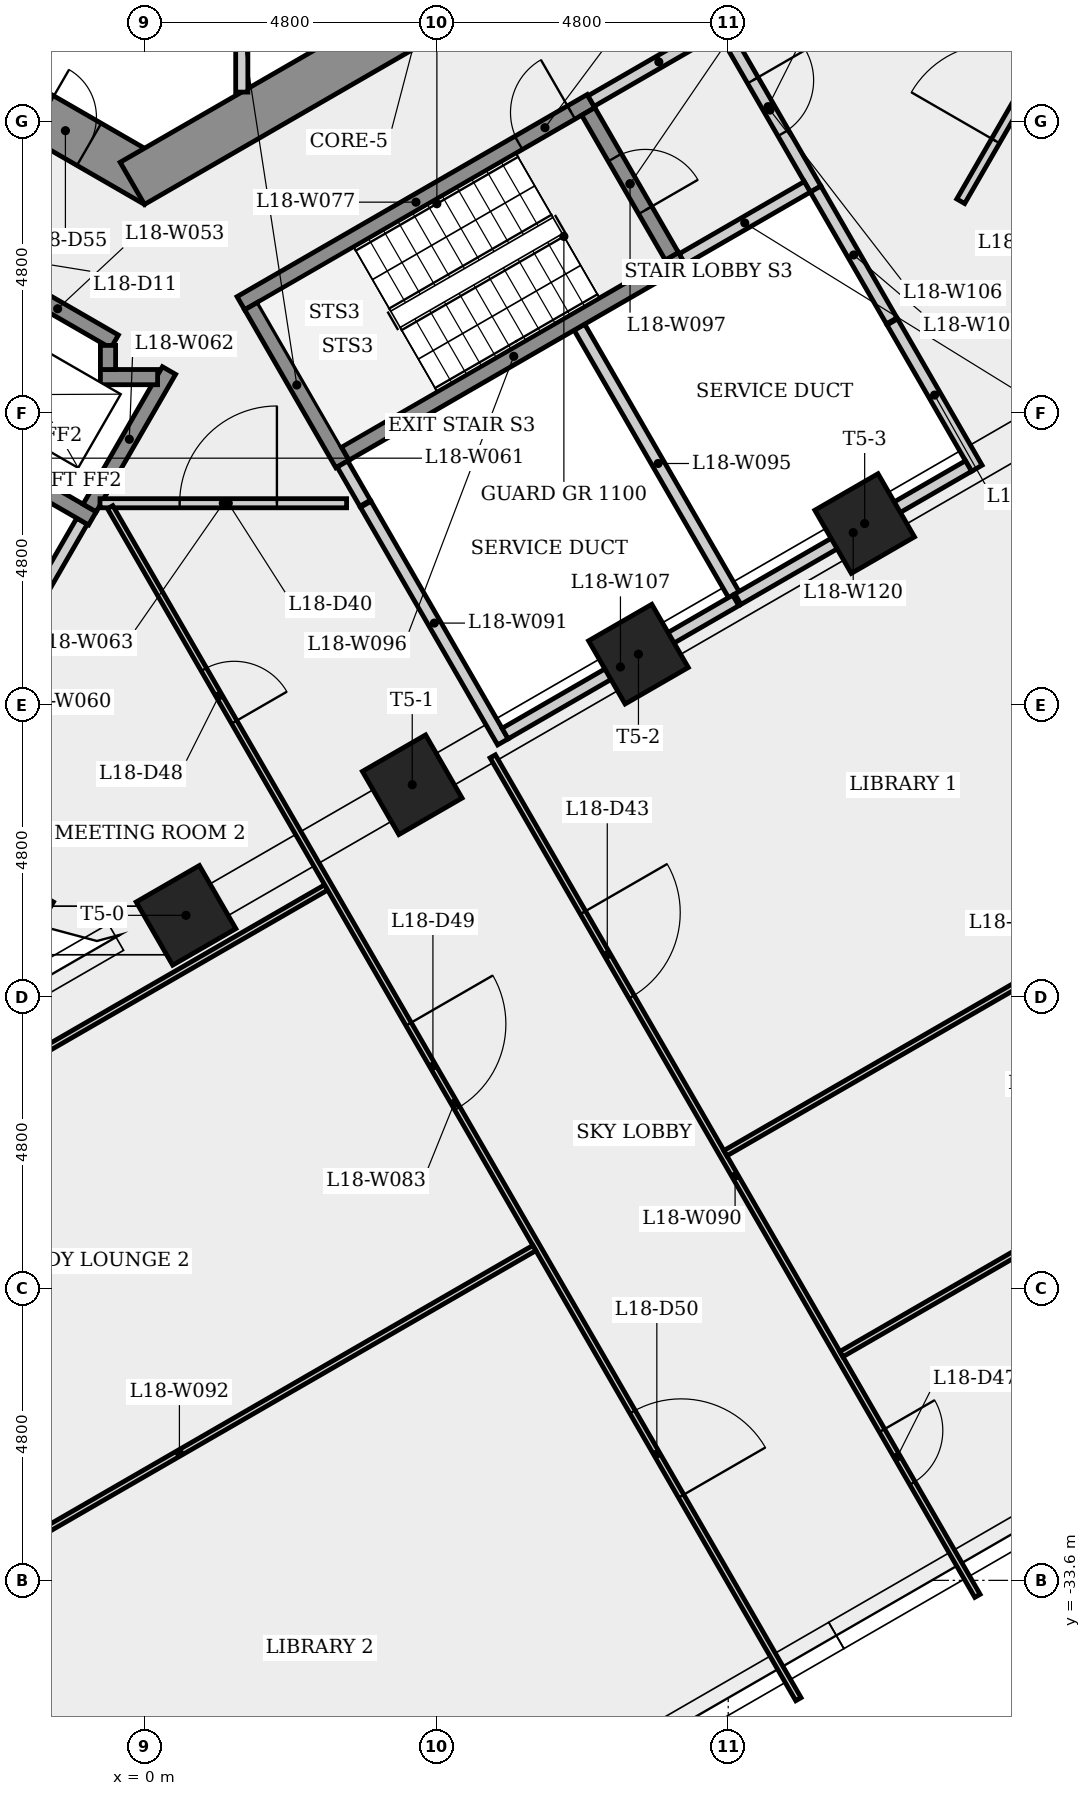
"""IFC4 building model, lengths in metres.
Left out: names, types, materials, properties, quantities, classifications, styles, units other than length and angle.
Written with IfcOpenShell. Run it as: python <this file> out.ifc"""

import sys

from ifc_helpers import new_model, si_unit, direction, frame, frame_2d, origin, origin_2d, place, context, subcontext, project, spatial, rectangle, extrude, element, fill, save


model = new_model("IFC4")
c1 = context("Model", 3, precision=1e-05, world=origin(), true_north=direction((0.0, 1.0)))
c2 = subcontext(c1, "Body", "Model", "MODEL_VIEW")
j1 = project(units=[si_unit("LENGTHUNIT", "METRE"), si_unit("PLANEANGLEUNIT", "RADIAN")], contexts=[c1])
p1 = place(None, origin())
s1 = spatial("IfcSite", under=j1, at=p1, CompositionType="ELEMENT")
p2 = place(p1, origin())
s2 = spatial("IfcBuilding", under=s1, at=p2, CompositionType="ELEMENT")
p3 = place(p2, frame((0.0, 0.0, 70.3)))
s3 = spatial("IfcBuildingStorey", under=s2, at=p3, CompositionType="ELEMENT", Elevation=70.3)
p4 = place(p3, frame((-9.3, -5.138, 0.0), z_axis=(0.0, 0.0, 1.0), x_axis=(0.866023993627, -0.500002442456, 0.0)))
e1 = element("IfcWall", 1, at=p4, inside=s3, PredefinedType="SHEAR", context=c2, shape_type="SweptSolid", body=[
    extrude(rectangle(XDim=10.97, YDim=0.8, at=frame_2d((5.485, 0.0))), origin(), (0.0, 0.0, 1.0), 4.0),
])
p5 = place(p4, frame((2.153, 0.0, 0.0)))
e2 = element("IfcOpeningElement", 2, at=p5, cuts=e1, PredefinedType="OPENING", context=c2, shape_type="SweptSolid", body=[
    extrude(rectangle(XDim=0.9, YDim=2.1, at=frame_2d((0.45, 1.05))), frame((0.0, 0.41, 0.0), z_axis=(0.0, -1.0, 0.0), x_axis=(1.0, 0.0, 0.0)), (0.0, 0.0, 1.0), 0.82),
])
p6 = place(p4, frame((8.787, 0.0, 0.0)))
e3 = element("IfcOpeningElement", 3, at=p6, cuts=e1, PredefinedType="OPENING", context=c2, shape_type="SweptSolid", body=[
    extrude(rectangle(XDim=0.9, YDim=2.1, at=frame_2d((0.45, 1.05))), frame((0.0, 0.41, 0.0), z_axis=(0.0, -1.0, 0.0), x_axis=(1.0, 0.0, 0.0)), (0.0, 0.0, 1.0), 0.82),
])
p7 = place(p3, frame((-0.2, -10.623, 0.0), z_axis=(0.0, 0.0, 1.0), x_axis=(0.866023993627, 0.500002442456, 0.0)))
e4 = element("IfcWall", 4, at=p7, inside=s3, PredefinedType="SHEAR", context=c2, shape_type="SweptSolid", body=[
    extrude(rectangle(XDim=10.97, YDim=0.8, at=frame_2d((5.485, 0.0))), origin(), (0.0, 0.0, 1.0), 4.0),
])
p8 = place(p7, frame((7.57, 0.0, 0.0)))
e5 = element("IfcOpeningElement", 5, at=p8, cuts=e4, PredefinedType="OPENING", context=c2, shape_type="SweptSolid", body=[
    extrude(rectangle(XDim=0.9, YDim=2.1, at=frame_2d((0.45, 1.05))), frame((0.0, 0.41, 0.0), z_axis=(0.0, -1.0, 0.0), x_axis=(1.0, 0.0, 0.0)), (0.0, 0.0, 1.0), 0.82),
])
for number, where, z_axis, x_axis in (
    (6, (-2.317, -22.662, 0.0), (0.0, 0.0, 1.0), (-0.5, -0.866, 0.0)),
    (7, (0.683, -22.662, 0.0), (0.0, 0.0, 1.0), (0.5, -0.866, 0.0)),
    (8, (4.403, -20.514, 0.0), (0.0, 0.0, 1.0), (0.5, -0.866, 0.0)),
    (9, (8.124, -18.366, 0.0), (0.0, 0.0, 1.0), (0.5, -0.866, 0.0)),
    (10, (11.844, -16.219, 0.0), (0.0, 0.0, 1.0), (0.5, -0.866, 0.0)),
):
    element("IfcColumn", number, at=place(p3, frame(where, z_axis=z_axis, x_axis=x_axis)), inside=s3, PredefinedType="COLUMN", context=c2, shape_type="SweptSolid", body=[
        extrude(rectangle(XDim=1.2, YDim=1.2, at=origin_2d()), origin(), (0.0, 0.0, 1.0), 4.0),
    ])
p9 = place(p3, frame((-2.364, -12.145, 0.0), z_axis=(0.0, 0.0, 1.0), x_axis=(0.86603892542, -0.499976579108, 0.0)))
e11 = element("IfcWall", 11, at=p9, inside=s3, PredefinedType="SHEAR", context=c2, shape_type="SweptSolid", body=[
    extrude(rectangle(XDim=2.162, YDim=0.25, at=frame_2d((1.081, 0.0))), origin(), (0.0, 0.0, 1.0), 3.6),
])
p10 = place(p3, frame((-1.027, -16.179, 0.0), z_axis=(0.0, 0.0, 1.0), x_axis=(-0.499984476993, -0.866034365811, 0.0)))
e12 = element("IfcWall", 12, at=p10, inside=s3, PredefinedType="PLUMBINGWALL", context=c2, shape_type="SweptSolid", body=[
    extrude(rectangle(XDim=6.856, YDim=0.2, at=frame_2d((3.428, 0.0))), origin(), (0.0, 0.0, 1.0), 3.6),
])
p11 = place(p3, frame((-0.856, -16.133, 0.0), z_axis=(0.0, 0.0, 1.0), x_axis=(-0.866021716278, 0.500006386895, 0.0)))
e13 = element("IfcWall", 13, at=p11, inside=s3, PredefinedType="SHEAR", context=c2, shape_type="SweptSolid", body=[
    extrude(rectangle(XDim=3.3, YDim=0.25, at=frame_2d((1.65, 0.0))), origin(), (0.0, 0.0, 1.0), 3.6),
])
p12 = place(p3, frame((-0.902, -15.962, 0.0), z_axis=(0.0, 0.0, 1.0), x_axis=(0.499981517636, 0.866036074319, 0.0)))
e14 = element("IfcWall", 14, at=p12, inside=s3, PredefinedType="SHEAR", context=c2, shape_type="SweptSolid", body=[
    extrude(rectangle(XDim=2.61, YDim=0.25, at=frame_2d((1.305, 0.0))), origin(), (0.0, 0.0, 1.0), 3.6),
])
p13 = place(p3, frame((-0.732, -15.885, 0.0), z_axis=(0.0, 0.0, 1.0), x_axis=(1.0, 0.0, 0.0)))
e15 = element("IfcWall", 15, at=p13, inside=s3, PredefinedType="PARTITIONING", context=c2, shape_type="SweptSolid", body=[
    extrude(rectangle(XDim=4.056, YDim=0.15, at=frame_2d((2.028, 0.0))), origin(), (0.0, 0.0, 1.0), 3.6),
])
p14 = place(p13, frame((1.31, 0.0, 0.0)))
e16 = element("IfcOpeningElement", 16, at=p14, cuts=e15, PredefinedType="OPENING", context=c2, shape_type="SweptSolid", body=[
    extrude(rectangle(XDim=1.6, YDim=2.1, at=frame_2d((0.8, 1.05))), frame((0.0, 0.085, 0.0), z_axis=(0.0, -1.0, 0.0), x_axis=(1.0, 0.0, 0.0)), (0.0, 0.0, 1.0), 0.17),
])
p15 = place(p3, frame((-0.725, -13.81, 0.0), z_axis=(0.0, 0.0, 1.0), x_axis=(1.0, 0.0, 0.0)))
e17 = element("IfcWall", 17, at=p15, inside=s3, PredefinedType="SHEAR", context=c2, shape_type="SweptSolid", body=[
    extrude(rectangle(XDim=0.941, YDim=0.25, at=frame_2d((0.47, 0.0))), origin(), (0.0, 0.0, 1.0), 4.0),
])
p16 = place(p3, frame((-0.6, -13.289, 0.0), z_axis=(0.0, 0.0, 1.0), x_axis=(0.0, -1.0, 0.0)))
e18 = element("IfcWall", 18, at=p16, inside=s3, PredefinedType="SHEAR", context=c2, shape_type="SweptSolid", body=[
    extrude(rectangle(XDim=0.396, YDim=0.25, at=frame_2d((0.198, 0.0))), origin(), (0.0, 0.0, 1.0), 4.0),
])
p17 = place(p3, frame((1.6, -5.275, 0.0), z_axis=(0.0, 0.0, 1.0), x_axis=(0.0, -1.0, 0.0)))
e19 = element("IfcWall", 19, at=p17, inside=s3, PredefinedType="PARTITIONING", context=c2, shape_type="SweptSolid", body=[
    extrude(rectangle(XDim=3.847, YDim=0.2, at=frame_2d((1.924, 0.0))), origin(), (0.0, 0.0, 1.0), 3.6),
])
p18 = place(p3, frame((1.585, -12.595, 0.0), z_axis=(0.0, 0.0, 1.0), x_axis=(0.866036417653, 0.499980922934, 0.0)))
e20 = element("IfcWall", 20, at=p18, inside=s3, PredefinedType="SHEAR", context=c2, shape_type="SweptSolid", body=[
    extrude(rectangle(XDim=6.65, YDim=0.25, at=frame_2d((3.325, 0.0))), origin(), (0.0, 0.0, 1.0), 3.6),
])
p19 = place(p18, frame((5.275, 0.0, 0.0)))
e21 = element("IfcOpeningElement", 21, at=p19, cuts=e20, PredefinedType="OPENING", context=c2, shape_type="SweptSolid", body=[
    extrude(rectangle(XDim=1.0, YDim=2.1, at=frame_2d((0.5, 1.05))), frame((0.0, 0.135, 0.0), z_axis=(0.0, -1.0, 0.0), x_axis=(1.0, 0.0, 0.0)), (0.0, 0.0, 1.0), 0.27),
])
p20 = place(p3, frame((2.988, -22.203, 0.0), z_axis=(0.0, 0.0, 1.0), x_axis=(-0.866023652272, -0.500003033696, 0.0)))
e22 = element("IfcWall", 22, at=p20, inside=s3, PredefinedType="PARTITIONING", context=c2, shape_type="SweptSolid", body=[
    extrude(rectangle(XDim=13.482, YDim=0.1, at=frame_2d((6.741, 0.0))), origin(), (0.0, 0.0, 1.0), 3.6),
])
p21 = place(p3, frame((-0.565, -15.949, 0.0), z_axis=(0.0, 0.0, 1.0), x_axis=(0.500000334318, -0.866025210766, 0.0)))
e23 = element("IfcWall", 23, at=p21, inside=s3, PredefinedType="PARTITIONING", context=c2, shape_type="SweptSolid", body=[
    extrude(rectangle(XDim=22.638, YDim=0.1, at=frame_2d((11.319, 0.0))), origin(), (0.0, 0.0, 1.0), 3.6),
])
p22 = place(p21, frame((3.081, 0.0, 0.0)))
e24 = element("IfcOpeningElement", 24, at=p22, cuts=e23, PredefinedType="OPENING", context=c2, shape_type="SweptSolid", body=[
    extrude(rectangle(XDim=1.0, YDim=2.1, at=frame_2d((0.5, 1.05))), frame((0.0, 0.06, 0.0), z_axis=(0.0, -1.0, 0.0), x_axis=(1.0, 0.0, 0.0)), (0.0, 0.0, 1.0), 0.12),
])
p23 = place(p21, frame((9.817, 0.0, 0.0)))
e25 = element("IfcOpeningElement", 25, at=p23, cuts=e23, PredefinedType="OPENING", context=c2, shape_type="SweptSolid", body=[
    extrude(rectangle(XDim=1.6, YDim=2.1, at=frame_2d((0.8, 1.05))), frame((0.0, 0.06, 0.0), z_axis=(0.0, -1.0, 0.0), x_axis=(1.0, 0.0, 0.0)), (0.0, 0.0, 1.0), 0.12),
])
p24 = place(p21, frame((17.182, 0.0, 0.0)))
e26 = element("IfcOpeningElement", 26, at=p24, cuts=e23, PredefinedType="OPENING", context=c2, shape_type="SweptSolid", body=[
    extrude(rectangle(XDim=1.6, YDim=2.1, at=frame_2d((0.8, 1.05))), frame((0.0, 0.06, 0.0), z_axis=(0.0, -1.0, 0.0), x_axis=(1.0, 0.0, 0.0)), (0.0, 0.0, 1.0), 0.12),
])
p25 = place(p3, frame((3.256, -15.239, 0.0), z_axis=(0.0, 0.0, 1.0), x_axis=(-0.50002537861, 0.866010750942, 0.0)))
e27 = element("IfcWall", 27, at=p25, inside=s3, PredefinedType="SHEAR", context=c2, shape_type="SweptSolid", body=[
    extrude(rectangle(XDim=3.0, YDim=0.25, at=frame_2d((1.5, 0.0))), origin(), (0.0, 0.0, 1.0), 3.6),
])
p26 = place(p3, frame((3.628, -15.885, 0.0), z_axis=(0.0, 0.0, 1.0), x_axis=(-0.499977539641, 0.866038370891, 0.0)))
e28 = element("IfcWall", 28, at=p26, inside=s3, PredefinedType="PLUMBINGWALL", context=c2, shape_type="SweptSolid", body=[
    extrude(rectangle(XDim=0.746, YDim=0.2, at=frame_2d((0.373, 0.0))), origin(), (0.0, 0.0, 1.0), 3.6),
])
p27 = place(p3, frame((5.727, -20.047, 0.0), z_axis=(0.0, 0.0, 1.0), x_axis=(0.49999285859, -0.86602952684, 0.0)))
e29 = element("IfcWall", 29, at=p27, inside=s3, PredefinedType="PARTITIONING", context=c2, shape_type="SweptSolid", body=[
    extrude(rectangle(XDim=15.944, YDim=0.1, at=frame_2d((7.972, 0.0))), origin(), (0.0, 0.0, 1.0), 3.6),
])
p28 = place(p27, frame((2.968, 0.0, 0.0)))
e30 = element("IfcOpeningElement", 30, at=p28, cuts=e29, PredefinedType="OPENING", context=c2, shape_type="SweptSolid", body=[
    extrude(rectangle(XDim=1.6, YDim=2.1, at=frame_2d((0.8, 1.05))), frame((0.0, 0.06, 0.0), z_axis=(0.0, -1.0, 0.0), x_axis=(1.0, 0.0, 0.0)), (0.0, 0.0, 1.0), 0.12),
])
p29 = place(p27, frame((12.805, 0.0, 0.0)))
e31 = element("IfcOpeningElement", 31, at=p29, cuts=e29, PredefinedType="OPENING", context=c2, shape_type="SweptSolid", body=[
    extrude(rectangle(XDim=1.0, YDim=2.1, at=frame_2d((0.5, 1.05))), frame((0.0, 0.06, 0.0), z_axis=(0.0, -1.0, 0.0), x_axis=(1.0, 0.0, 0.0)), (0.0, 0.0, 1.0), 0.12),
])
p30 = place(p3, frame((5.894, -19.809, 0.0), z_axis=(0.0, 0.0, 1.0), x_axis=(-0.499980071345, 0.866036909293, 0.0)))
e32 = element("IfcWall", 32, at=p30, inside=s3, PredefinedType="PLUMBINGWALL", context=c2, shape_type="SweptSolid", body=[
    extrude(rectangle(XDim=4.512, YDim=0.2, at=frame_2d((2.256, 0.0))), origin(), (0.0, 0.0, 1.0), 3.6),
])
p31 = place(p3, frame((6.412, -28.134, 0.0), z_axis=(0.0, 0.0, 1.0), x_axis=(-0.86603149334, -0.499989452433, 0.0)))
e33 = element("IfcWall", 33, at=p31, inside=s3, PredefinedType="PARTITIONING", context=c2, shape_type="SweptSolid", body=[
    extrude(rectangle(XDim=13.482, YDim=0.1, at=frame_2d((6.741, 0.0))), origin(), (0.0, 0.0, 1.0), 3.6),
])
p32 = place(p3, frame((7.153, -12.989, 0.0), z_axis=(0.0, 0.0, 1.0), x_axis=(0.499993196246, -0.866029331898, 0.0)))
e34 = element("IfcWall", 34, at=p32, inside=s3, PredefinedType="PLUMBINGWALL", context=c2, shape_type="SweptSolid", body=[
    extrude(rectangle(XDim=5.178, YDim=0.2, at=frame_2d((2.589, 0.0))), origin(), (0.0, 0.0, 1.0), 3.6),
])
p33 = place(p3, frame((3.301, -15.068, 0.0), z_axis=(0.0, 0.0, 1.0), x_axis=(0.866035036182, 0.499983315828, 0.0)))
e35 = element("IfcWall", 35, at=p33, inside=s3, PredefinedType="SHEAR", context=c2, shape_type="SweptSolid", body=[
    extrude(rectangle(XDim=6.4, YDim=0.25, at=frame_2d((3.2, 0.0))), origin(), (0.0, 0.0, 1.0), 4.0),
])
p34 = place(p3, frame((7.298, -9.441, 0.0), z_axis=(0.0, 0.0, 1.0), x_axis=(0.500034990121, -0.866005201286, 0.0)))
e36 = element("IfcWall", 36, at=p34, inside=s3, PredefinedType="SHEAR", context=c2, shape_type="SweptSolid", body=[
    extrude(rectangle(XDim=2.75, YDim=0.25, at=frame_2d((1.375, 0.0))), origin(), (0.0, 0.0, 1.0), 3.6),
])
p35 = place(p34, frame((0.875, 0.0, 0.0)))
e37 = element("IfcOpeningElement", 37, at=p35, cuts=e36, PredefinedType="OPENING", context=c2, shape_type="SweptSolid", body=[
    extrude(rectangle(XDim=1.0, YDim=2.1, at=frame_2d((0.5, 1.05))), frame((0.0, 0.135, 0.0), z_axis=(0.0, -1.0, 0.0), x_axis=(1.0, 0.0, 0.0)), (0.0, 0.0, 1.0), 0.27),
])
p36 = place(p3, frame((7.344, -9.27, 0.0), z_axis=(0.0, 0.0, 1.0), x_axis=(0.866005588531, 0.500034319456, 0.0)))
e38 = element("IfcWall", 38, at=p36, inside=s3, PredefinedType="PARTITIONING", context=c2, shape_type="SweptSolid", body=[
    extrude(rectangle(XDim=2.575, YDim=0.2, at=frame_2d((1.288, 0.0))), origin(), (0.0, 0.0, 1.0), 3.6),
])
p37 = place(p3, frame((9.537, -8.119, 0.0), z_axis=(0.0, 0.0, 1.0), x_axis=(0.499990139034, -0.866031096941, 0.0)))
e39 = element("IfcWall", 39, at=p37, inside=s3, PredefinedType="PARTITIONING", context=c2, shape_type="SweptSolid", body=[
    extrude(rectangle(XDim=3.0, YDim=0.2, at=frame_2d((1.5, 0.0))), origin(), (0.0, 0.0, 1.0), 3.6),
])
p38 = place(p37, frame((0.935, 0.0, 0.0)))
e40 = element("IfcOpeningElement", 40, at=p38, cuts=e39, PredefinedType="OPENING", context=c2, shape_type="SweptSolid", body=[
    extrude(rectangle(XDim=1.0, YDim=2.1, at=frame_2d((0.5, 1.05))), frame((0.0, 0.11, 0.0), z_axis=(0.0, -1.0, 0.0), x_axis=(1.0, 0.0, 0.0)), (0.0, 0.0, 1.0), 0.22),
])
p39 = place(p3, frame((9.724, -17.483, 0.0), z_axis=(0.0, 0.0, 1.0), x_axis=(-0.866032430508, -0.49998782916, 0.0)))
e41 = element("IfcWall", 41, at=p39, inside=s3, PredefinedType="PLUMBINGWALL", context=c2, shape_type="SweptSolid", body=[
    extrude(rectangle(XDim=4.38, YDim=0.2, at=frame_2d((2.19, 0.0))), origin(), (0.0, 0.0, 1.0), 2.675),
])
p40 = place(p3, frame((10.901, -10.681, 0.0), z_axis=(0.0, 0.0, 1.0), x_axis=(-0.866007538022, -0.500030943131, 0.0)))
e42 = element("IfcWall", 42, at=p40, inside=s3, PredefinedType="PLUMBINGWALL", context=c2, shape_type="SweptSolid", body=[
    extrude(rectangle(XDim=2.375, YDim=0.2, at=frame_2d((1.188, 0.0))), origin(), (0.0, 0.0, 1.0), 3.6),
])
p41 = place(p3, frame((11.037, -10.717, 0.0), z_axis=(0.0, 0.0, 1.0), x_axis=(0.499989877761, -0.866031247783, 0.0)))
e43 = element("IfcWall", 43, at=p41, inside=s3, PredefinedType="PLUMBINGWALL", context=c2, shape_type="SweptSolid", body=[
    extrude(rectangle(XDim=2.502, YDim=0.2, at=frame_2d((1.251, 0.0))), origin(), (0.0, 0.0, 1.0), 3.6),
])
p42 = place(p3, frame((12.299, -12.902, 0.0), z_axis=(0.0, 0.0, 1.0), x_axis=(0.500049332001, -0.865996920067, 0.0)))
e44 = element("IfcWall", 44, at=p42, inside=s3, PredefinedType="PLUMBINGWALL", context=c2, shape_type="SweptSolid", body=[
    extrude(rectangle(XDim=2.78, YDim=0.2, at=frame_2d((1.39, 0.0))), origin(), (0.0, 0.0, 1.0), 3.6),
])
p43 = place(p3, frame((13.552, -15.273, 0.0), z_axis=(0.0, 0.0, 1.0), x_axis=(-0.866008294434, -0.500029633093, 0.0)))
e45 = element("IfcWall", 45, at=p43, inside=s3, PredefinedType="PLUMBINGWALL", context=c2, shape_type="SweptSolid", body=[
    extrude(rectangle(XDim=4.38, YDim=0.2, at=frame_2d((2.19, 0.0))), origin(), (0.0, 0.0, 1.0), 2.675),
])
p44 = place(p3, frame((13.424, -10.918, 0.0), z_axis=(0.0, 0.0, 1.0), x_axis=(0.499992877875, 0.866029515706, 0.0)))
e46 = element("IfcWall", 46, at=p44, inside=s3, PredefinedType="PARTITIONING", context=c2, shape_type="SweptSolid", body=[
    extrude(rectangle(XDim=6.043, YDim=0.15, at=frame_2d((3.022, 0.0))), origin(), (0.0, 0.0, 1.0), 3.6),
])
p45 = place(p44, frame((1.146, 0.0, 0.0)))
e47 = element("IfcOpeningElement", 47, at=p45, cuts=e46, PredefinedType="OPENING", context=c2, shape_type="SweptSolid", body=[
    extrude(rectangle(XDim=1.6, YDim=2.1, at=frame_2d((0.8, 1.05))), frame((0.0, 0.085, 0.0), z_axis=(0.0, -1.0, 0.0), x_axis=(1.0, 0.0, 0.0)), (0.0, 0.0, 1.0), 0.17),
])
for number, where, z_axis, x_axis in (
    (48, (19.193, -21.009, 0.0), (0.0, 0.0, 1.0), (-0.866, -0.5, 0.0)),
    (49, (21.101, -24.314, 0.0), (0.0, 0.0, 1.0), (-0.866, -0.5, 0.0)),
):
    element("IfcWall", number, at=place(p3, frame(where, z_axis=z_axis, x_axis=x_axis)), inside=s3, PredefinedType="PARTITIONING", context=c2, shape_type="SweptSolid", body=[
        extrude(rectangle(XDim=11.131, YDim=0.1, at=frame_2d((5.565, 0.0))), origin(), (0.0, 0.0, 1.0), 3.6),
    ])
p46 = place(p19, origin())
e50 = element("IfcDoor", 50, at=p46, inside=s3, OperationType="SINGLE_SWING_RIGHT", PredefinedType="DOOR", context=c2, shape_type="SweptSolid", body=[
    extrude(rectangle(XDim=1.0, YDim=2.1, at=frame_2d((0.5, 1.05))), frame((0.0, 0.025, 0.0), z_axis=(0.0, -1.0, 0.0), x_axis=(1.0, 0.0, 0.0)), (0.0, 0.0, 1.0), 0.05),
])
fill(e21, e50)
p47 = place(p38, origin())
e51 = element("IfcDoor", 51, at=p47, inside=s3, OperationType="SINGLE_SWING_LEFT", PredefinedType="DOOR", context=c2, shape_type="SweptSolid", body=[
    extrude(rectangle(XDim=1.0, YDim=2.1, at=frame_2d((0.5, 1.05))), frame((0.0, 0.025, 0.0), z_axis=(0.0, -1.0, 0.0), x_axis=(1.0, 0.0, 0.0)), (0.0, 0.0, 1.0), 0.05),
])
fill(e40, e51)
p48 = place(p35, origin())
e52 = element("IfcDoor", 52, at=p48, inside=s3, OperationType="SINGLE_SWING_RIGHT", PredefinedType="DOOR", context=c2, shape_type="SweptSolid", body=[
    extrude(rectangle(XDim=1.0, YDim=2.1, at=frame_2d((0.5, 1.05))), frame((0.0, 0.025, 0.0), z_axis=(0.0, -1.0, 0.0), x_axis=(1.0, 0.0, 0.0)), (0.0, 0.0, 1.0), 0.05),
])
fill(e37, e52)
p49 = place(p14, origin())
e53 = element("IfcDoor", 53, at=p49, inside=s3, OperationType="SINGLE_SWING_RIGHT", PredefinedType="DOOR", context=c2, shape_type="SweptSolid", body=[
    extrude(rectangle(XDim=1.6, YDim=2.1, at=frame_2d((0.8, 1.05))), frame((0.0, 0.025, 0.0), z_axis=(0.0, -1.0, 0.0), x_axis=(1.0, 0.0, 0.0)), (0.0, 0.0, 1.0), 0.05),
])
fill(e16, e53)
p50 = place(p45, origin())
e54 = element("IfcDoor", 54, at=p50, inside=s3, OperationType="SINGLE_SWING_LEFT", PredefinedType="DOOR", context=c2, shape_type="SweptSolid", body=[
    extrude(rectangle(XDim=1.6, YDim=2.1, at=frame_2d((0.8, 1.05))), frame((0.0, 0.025, 0.0), z_axis=(0.0, -1.0, 0.0), x_axis=(1.0, 0.0, 0.0)), (0.0, 0.0, 1.0), 0.05),
])
fill(e47, e54)
p51 = place(p28, origin())
e55 = element("IfcDoor", 55, at=p51, inside=s3, OperationType="SINGLE_SWING_LEFT", PredefinedType="DOOR", context=c2, shape_type="SweptSolid", body=[
    extrude(rectangle(XDim=1.6, YDim=2.1, at=frame_2d((0.8, 1.05))), frame((0.0, 0.025, 0.0), z_axis=(0.0, -1.0, 0.0), x_axis=(1.0, 0.0, 0.0)), (0.0, 0.0, 1.0), 0.05),
])
fill(e30, e55)
p52 = place(p29, origin())
e56 = element("IfcDoor", 56, at=p52, inside=s3, OperationType="SINGLE_SWING_LEFT", PredefinedType="DOOR", context=c2, shape_type="SweptSolid", body=[
    extrude(rectangle(XDim=1.0, YDim=2.1, at=frame_2d((0.5, 1.05))), frame((0.0, 0.025, 0.0), z_axis=(0.0, -1.0, 0.0), x_axis=(1.0, 0.0, 0.0)), (0.0, 0.0, 1.0), 0.05),
])
fill(e31, e56)
p53 = place(p22, origin())
e57 = element("IfcDoor", 57, at=p53, inside=s3, OperationType="SINGLE_SWING_RIGHT", PredefinedType="DOOR", context=c2, shape_type="SweptSolid", body=[
    extrude(rectangle(XDim=1.0, YDim=2.1, at=frame_2d((0.5, 1.05))), frame((0.0, 0.025, 0.0), z_axis=(0.0, -1.0, 0.0), x_axis=(1.0, 0.0, 0.0)), (0.0, 0.0, 1.0), 0.05),
])
fill(e24, e57)
p54 = place(p23, origin())
e58 = element("IfcDoor", 58, at=p54, inside=s3, OperationType="SINGLE_SWING_LEFT", PredefinedType="DOOR", context=c2, shape_type="SweptSolid", body=[
    extrude(rectangle(XDim=1.6, YDim=2.1, at=frame_2d((0.8, 1.05))), frame((0.0, 0.025, 0.0), z_axis=(0.0, -1.0, 0.0), x_axis=(1.0, 0.0, 0.0)), (0.0, 0.0, 1.0), 0.05),
])
fill(e25, e58)
p55 = place(p24, origin())
e59 = element("IfcDoor", 59, at=p55, inside=s3, OperationType="SINGLE_SWING_RIGHT", PredefinedType="DOOR", context=c2, shape_type="SweptSolid", body=[
    extrude(rectangle(XDim=1.6, YDim=2.1, at=frame_2d((0.8, 1.05))), frame((0.0, 0.025, 0.0), z_axis=(0.0, -1.0, 0.0), x_axis=(1.0, 0.0, 0.0)), (0.0, 0.0, 1.0), 0.05),
])
fill(e26, e59)
p56 = place(p6, origin())
e60 = element("IfcDoor", 60, at=p56, inside=s3, OperationType="SINGLE_SWING_LEFT", PredefinedType="DOOR", context=c2, shape_type="SweptSolid", body=[
    extrude(rectangle(XDim=0.9, YDim=2.1, at=frame_2d((0.45, 1.05))), frame((0.0, 0.025, 0.0), z_axis=(0.0, -1.0, 0.0), x_axis=(1.0, 0.0, 0.0)), (0.0, 0.0, 1.0), 0.05),
])
fill(e3, e60)
save(model, sys.argv[1])
